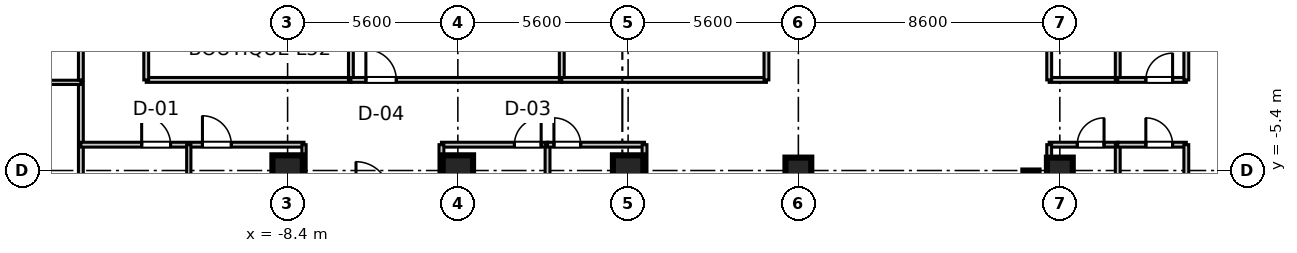
"""IFC4 building model, lengths in metres.
Left out: names, types, materials, properties, quantities, classifications, styles, units other than length and angle.
Written with IfcOpenShell. Run it as: python <this file> out.ifc"""

import sys

from ifc_helpers import new_model, si_unit, direction, frame, frame_2d, origin, origin_2d, place, context, subcontext, project, spatial, rectangle, extrude, source, transform, mapped, element, fill, save


model = new_model("IFC4")
c1 = context("Model", 3, precision=1e-05, world=origin(), true_north=direction((0.0, 1.0)))
c2 = subcontext(c1, "Body", "Model", "MODEL_VIEW")
j1 = project(units=[si_unit("LENGTHUNIT", "METRE"), si_unit("PLANEANGLEUNIT", "RADIAN")], contexts=[c1])
p1 = place(None, origin())
s1 = spatial("IfcSite", under=j1, at=p1, CompositionType="ELEMENT")
p2 = place(p1, origin())
s2 = spatial("IfcBuilding", under=s1, at=p2, CompositionType="ELEMENT")
p3 = place(p2, frame((0.0, 0.0, 204.9)))
s3 = spatial("IfcBuildingStorey", under=s2, at=p3, CompositionType="ELEMENT", Elevation=204.9)
m1 = source(origin(), c2, "Body", "SweptSolid", [
    extrude(rectangle(XDim=1.0, YDim=1.0, at=origin_2d()), origin(), (0.0, 0.0, 1.0), 3.655),
])
for number, where, z_axis, x_axis in (
    (1, (-8.4, -5.4, 0.0), (0.0, 0.0, 1.0), (1.0, 0.0, 0.0)),
    (2, (-2.8, -5.4, 0.0), (0.0, 0.0, 1.0), (1.0, 0.0, 0.0)),
    (3, (2.8, -5.4, 0.0), (0.0, 0.0, 1.0), (1.0, 0.0, 0.0)),
):
    element("IfcColumn", number, at=place(p3, frame(where, z_axis=z_axis, x_axis=x_axis)), inside=s3, PredefinedType="COLUMN", context=c2, shape_type="MappedRepresentation", body=[
        mapped(m1, transform((0.0, 0.0, 0.0), scale=1.0)),
    ])
m2 = source(origin(), c2, "Body", "SweptSolid", [
    extrude(rectangle(XDim=0.85, YDim=0.85, at=origin_2d()), origin(), (0.0, 0.0, 1.0), 3.655),
])
for number, where, z_axis, x_axis in (
    (4, (8.4, -5.4, 0.0), (0.0, 0.0, 1.0), (1.0, 0.0, 0.0)),
    (5, (17.0, -5.4, 0.0), (0.0, 0.0, 1.0), (1.0, 0.0, 0.0)),
):
    element("IfcColumn", number, at=place(p3, frame(where, z_axis=z_axis, x_axis=x_axis)), inside=s3, PredefinedType="PILASTER", context=c2, shape_type="MappedRepresentation", body=[
        mapped(m2, transform((0.0, 0.0, 0.0), scale=1.0)),
    ])
m3 = source(origin(), c2, "Body", "SweptSolid", [
    extrude(rectangle(XDim=11.6, YDim=0.5, at=frame_2d((5.8, 0.0))), origin(), (0.0, 0.0, 1.0), 3.41),
])
p4 = place(p3, frame((16.05, -17.0, 0.0), z_axis=(0.0, 0.0, 1.0), x_axis=(0.0, 1.0, 0.0)))
e6 = element("IfcWall", 6, at=p4, inside=s3, PredefinedType="SHEAR", context=c2, shape_type="MappedRepresentation", body=[
    mapped(m3, transform((0.0, 0.0, 0.0), scale=1.0)),
])
m4 = source(origin(), c2, "Body", "SweptSolid", [
    extrude(rectangle(XDim=2.255, YDim=0.16, at=frame_2d((1.127, 0.0))), origin(), (0.0, 0.0, 1.0), 2.75),
])
p5 = place(p3, frame((16.65, -4.55, 0.0), z_axis=(0.0, 0.0, 1.0), x_axis=(1.0, 0.0, 0.0)))
e7 = element("IfcWall", 7, at=p5, inside=s3, PredefinedType="PARTITIONING", context=c2, shape_type="MappedRepresentation", body=[
    mapped(m4, transform((0.0, 0.0, 0.0), scale=1.0)),
])
p6 = place(p5, frame((0.924, 0.0, 0.0)))
e8 = element("IfcOpeningElement", 8, at=p6, cuts=e7, PredefinedType="OPENING", context=c2, shape_type="SweptSolid", body=[
    extrude(rectangle(XDim=0.88, YDim=2.1, at=frame_2d((0.44, 1.05))), frame((0.0, 0.09, 0.0), z_axis=(0.0, -1.0, 0.0), x_axis=(1.0, 0.0, 0.0)), (0.0, 0.0, 1.0), 0.18),
])
m5 = source(origin(), c2, "Body", "SweptSolid", [
    extrude(rectangle(XDim=19.35, YDim=0.16, at=frame_2d((9.675, 0.0))), origin(), (0.0, 0.0, 1.0), 2.75),
])
for number, where, z_axis, x_axis in (
    (9, (16.65, -23.9, 0.0), (0.0, 0.0, 1.0), (0.0, 1.0, 0.0)),
    (10, (18.905, -23.9, 0.0), (0.0, 0.0, 1.0), (0.0, 1.0, 0.0)),
):
    element("IfcWall", number, at=place(p3, frame(where, z_axis=z_axis, x_axis=x_axis)), inside=s3, PredefinedType="PARTITIONING", context=c2, shape_type="MappedRepresentation", body=[
        mapped(m5, transform((0.0, 0.0, 0.0), scale=1.0)),
    ])
m6 = source(origin(), c2, "Body", "SweptSolid", [
    extrude(rectangle(XDim=2.255, YDim=0.16, at=frame_2d((1.127, 0.0))), origin(), (0.0, 0.0, 1.0), 2.75),
])
p7 = place(p3, frame((18.905, -4.55, 0.0), z_axis=(0.0, 0.0, 1.0), x_axis=(1.0, 0.0, 0.0)))
e11 = element("IfcWall", 11, at=p7, inside=s3, PredefinedType="PARTITIONING", context=c2, shape_type="MappedRepresentation", body=[
    mapped(m6, transform((0.0, 0.0, 0.0), scale=1.0)),
])
p8 = place(p7, frame((0.924, 0.0, 0.0)))
e12 = element("IfcOpeningElement", 12, at=p8, cuts=e11, PredefinedType="OPENING", context=c2, shape_type="SweptSolid", body=[
    extrude(rectangle(XDim=0.88, YDim=2.1, at=frame_2d((0.44, 1.05))), frame((0.0, 0.09, 0.0), z_axis=(0.0, -1.0, 0.0), x_axis=(1.0, 0.0, 0.0)), (0.0, 0.0, 1.0), 0.18),
])
m7 = source(origin(), c2, "Body", "SweptSolid", [
    extrude(rectangle(XDim=17.93, YDim=0.16, at=frame_2d((8.965, 0.0))), origin(), (0.0, 0.0, 1.0), 2.75),
])
p9 = place(p3, frame((21.16, -22.48, 0.0), z_axis=(0.0, 0.0, 1.0), x_axis=(0.0, 1.0, 0.0)))
e13 = element("IfcWall", 13, at=p9, inside=s3, PredefinedType="PARTITIONING", context=c2, shape_type="MappedRepresentation", body=[
    mapped(m7, transform((0.0, 0.0, 0.0), scale=1.0)),
])
m8 = source(origin(), c2, "Body", "SweptSolid", [
    extrude(rectangle(XDim=21.4, YDim=0.16, at=frame_2d((10.7, 0.0))), origin(), (0.0, 0.0, 1.0), 2.75),
])
p10 = place(p3, frame((-15.2, -23.9, 0.0), z_axis=(0.0, 0.0, 1.0), x_axis=(0.0, 1.0, 0.0)))
e14 = element("IfcWall", 14, at=p10, inside=s3, PredefinedType="PARTITIONING", context=c2, shape_type="MappedRepresentation", body=[
    mapped(m8, transform((0.0, 0.0, 0.0), scale=1.0)),
])
p11 = place(p10, frame((12.3, 0.0, 0.0)))
e15 = element("IfcOpeningElement", 15, at=p11, cuts=e14, PredefinedType="OPENING", context=c2, shape_type="SweptSolid", body=[
    extrude(rectangle(XDim=0.95, YDim=2.1, at=frame_2d((0.475, 1.05))), frame((0.0, 0.09, 0.0), z_axis=(0.0, -1.0, 0.0), x_axis=(1.0, 0.0, 0.0)), (0.0, 0.0, 1.0), 0.18),
])
m9 = source(origin(), c2, "Body", "SweptSolid", [
    extrude(rectangle(XDim=5.96, YDim=0.14, at=frame_2d((2.98, 0.0))), origin(), (0.0, 0.0, 1.0), 2.75),
])
p12 = place(p3, frame((-21.16, -2.5, 0.0), z_axis=(0.0, 0.0, 1.0), x_axis=(1.0, 0.0, 0.0)))
e16 = element("IfcWall", 16, at=p12, inside=s3, PredefinedType="PARTITIONING", context=c2, shape_type="MappedRepresentation", body=[
    mapped(m9, transform((0.0, 0.0, 0.0), scale=1.0)),
])
m10 = source(origin(), c2, "Body", "SweptSolid", [
    extrude(rectangle(XDim=7.34, YDim=0.16, at=frame_2d((3.67, 0.0))), origin(), (0.0, 0.0, 1.0), 2.75),
])
p13 = place(p3, frame((-15.2, -4.55, 0.0), z_axis=(0.0, 0.0, 1.0), x_axis=(1.0, 0.0, 0.0)))
e17 = element("IfcWall", 17, at=p13, inside=s3, PredefinedType="PARTITIONING", context=c2, shape_type="MappedRepresentation", body=[
    mapped(m10, transform((0.0, 0.0, 0.0), scale=1.0)),
])
p14 = place(p13, frame((2.0, 0.0, 0.0)))
e18 = element("IfcOpeningElement", 18, at=p14, cuts=e17, PredefinedType="OPENING", context=c2, shape_type="SweptSolid", body=[
    extrude(rectangle(XDim=0.95, YDim=2.1, at=frame_2d((0.475, 1.05))), frame((0.0, 0.09, 0.0), z_axis=(0.0, -1.0, 0.0), x_axis=(1.0, 0.0, 0.0)), (0.0, 0.0, 1.0), 0.18),
])
p15 = place(p13, frame((3.999, 0.0, 0.0)))
e19 = element("IfcOpeningElement", 19, at=p15, cuts=e17, PredefinedType="OPENING", context=c2, shape_type="SweptSolid", body=[
    extrude(rectangle(XDim=0.95, YDim=2.1, at=frame_2d((0.475, 1.05))), frame((0.0, 0.09, 0.0), z_axis=(0.0, -1.0, 0.0), x_axis=(1.0, 0.0, 0.0)), (0.0, 0.0, 1.0), 0.18),
])
m11 = source(origin(), c2, "Body", "SweptSolid", [
    extrude(rectangle(XDim=19.35, YDim=0.14, at=frame_2d((9.675, 0.0))), origin(), (0.0, 0.0, 1.0), 2.75),
])
for number, where, z_axis, x_axis in (
    (20, (-7.86, -23.9, 0.0), (0.0, 0.0, 1.0), (0.0, 1.0, 0.0)),
    (21, (-11.65, -23.9, 0.0), (0.0, 0.0, 1.0), (0.0, 1.0, 0.0)),
):
    element("IfcWall", number, at=place(p3, frame(where, z_axis=z_axis, x_axis=x_axis)), inside=s3, PredefinedType="PARTITIONING", context=c2, shape_type="MappedRepresentation", body=[
        mapped(m11, transform((0.0, 0.0, 0.0), scale=1.0)),
    ])
m12 = source(origin(), c2, "Body", "SweptSolid", [
    extrude(rectangle(XDim=3.49, YDim=0.16, at=frame_2d((1.745, 0.0))), origin(), (0.0, 0.0, 1.0), 2.75),
])
p16 = place(p3, frame((-3.34, -4.55, 0.0), z_axis=(0.0, 0.0, 1.0), x_axis=(1.0, 0.0, 0.0)))
e22 = element("IfcWall", 22, at=p16, inside=s3, PredefinedType="PARTITIONING", context=c2, shape_type="MappedRepresentation", body=[
    mapped(m12, transform((0.0, 0.0, 0.0), scale=1.0)),
])
p17 = place(p16, frame((2.4, 0.0, 0.0)))
e23 = element("IfcOpeningElement", 23, at=p17, cuts=e22, PredefinedType="OPENING", context=c2, shape_type="SweptSolid", body=[
    extrude(rectangle(XDim=0.88, YDim=2.1, at=frame_2d((0.44, 1.05))), frame((0.0, 0.09, 0.0), z_axis=(0.0, -1.0, 0.0), x_axis=(1.0, 0.0, 0.0)), (0.0, 0.0, 1.0), 0.18),
])
for number, where, z_axis, x_axis in (
    (24, (-3.34, -23.9, 0.0), (0.0, 0.0, 1.0), (0.0, 1.0, 0.0)),
    (25, (0.15, -23.9, 0.0), (0.0, 0.0, 1.0), (0.0, 1.0, 0.0)),
):
    element("IfcWall", number, at=place(p3, frame(where, z_axis=z_axis, x_axis=x_axis)), inside=s3, PredefinedType="PARTITIONING", context=c2, shape_type="MappedRepresentation", body=[
        mapped(m5, transform((0.0, 0.0, 0.0), scale=1.0)),
    ])
m13 = source(origin(), c2, "Body", "SweptSolid", [
    extrude(rectangle(XDim=3.19, YDim=0.16, at=frame_2d((1.595, 0.0))), origin(), (0.0, 0.0, 1.0), 2.75),
])
p18 = place(p3, frame((0.15, -4.55, 0.0), z_axis=(0.0, 0.0, 1.0), x_axis=(1.0, 0.0, 0.0)))
e26 = element("IfcWall", 26, at=p18, inside=s3, PredefinedType="PARTITIONING", context=c2, shape_type="MappedRepresentation", body=[
    mapped(m13, transform((0.0, 0.0, 0.0), scale=1.0)),
])
p19 = place(p18, frame((0.21, 0.0, 0.0)))
e27 = element("IfcOpeningElement", 27, at=p19, cuts=e26, PredefinedType="OPENING", context=c2, shape_type="SweptSolid", body=[
    extrude(rectangle(XDim=0.88, YDim=2.1, at=frame_2d((0.44, 1.05))), frame((0.0, 0.09, 0.0), z_axis=(0.0, -1.0, 0.0), x_axis=(1.0, 0.0, 0.0)), (0.0, 0.0, 1.0), 0.18),
])
p20 = place(p3, frame((3.34, -23.9, 0.0), z_axis=(0.0, 0.0, 1.0), x_axis=(0.0, 1.0, 0.0)))
e28 = element("IfcWall", 28, at=p20, inside=s3, PredefinedType="PARTITIONING", context=c2, shape_type="MappedRepresentation", body=[
    mapped(m5, transform((0.0, 0.0, 0.0), scale=1.0)),
])
m14 = source(origin(), c2, "Body", "SweptSolid", [
    extrude(rectangle(XDim=4.84, YDim=0.16, at=frame_2d((2.42, 0.0))), origin(), (0.0, 0.0, 1.0), 2.75),
])
p21 = place(p3, frame((-15.2, -2.42, 0.0), z_axis=(0.0, 0.0, 1.0), x_axis=(0.0, 1.0, 0.0)))
e29 = element("IfcWall", 29, at=p21, inside=s3, PredefinedType="PARTITIONING", context=c2, shape_type="MappedRepresentation", body=[
    mapped(m14, transform((0.0, 0.0, 0.0), scale=1.0)),
])
p22 = place(p21, frame((1.945, 0.0, 0.0)))
e30 = element("IfcOpeningElement", 30, at=p22, cuts=e29, PredefinedType="OPENING", context=c2, shape_type="SweptSolid", body=[
    extrude(rectangle(XDim=0.95, YDim=2.1, at=frame_2d((0.475, 1.05))), frame((0.0, 0.09, 0.0), z_axis=(0.0, -1.0, 0.0), x_axis=(1.0, 0.0, 0.0)), (0.0, 0.0, 1.0), 0.18),
])
m15 = source(origin(), c2, "Body", "SweptSolid", [
    extrude(rectangle(XDim=6.732, YDim=0.16, at=frame_2d((3.366, 0.0))), origin(), (0.0, 0.0, 1.0), 2.75),
])
p23 = place(p3, frame((-13.05, -2.42, 0.0), z_axis=(0.0, 0.0, 1.0), x_axis=(1.0, 0.0, 0.0)))
e31 = element("IfcWall", 31, at=p23, inside=s3, PredefinedType="PARTITIONING", context=c2, shape_type="MappedRepresentation", body=[
    mapped(m15, transform((0.0, 0.0, 0.0), scale=1.0)),
])
for number, where, z_axis, x_axis in (
    (32, (-13.05, -2.42, 0.0), (0.0, 0.0, 1.0), (0.0, 1.0, 0.0)),
    (33, (-6.318, -2.42, 0.0), (0.0, 0.0, 1.0), (0.0, 1.0, 0.0)),
):
    element("IfcWall", number, at=place(p3, frame(where, z_axis=z_axis, x_axis=x_axis)), inside=s3, PredefinedType="PARTITIONING", context=c2, shape_type="MappedRepresentation", body=[
        mapped(m14, transform((0.0, 0.0, 0.0), scale=1.0)),
    ])
m16 = source(origin(), c2, "Body", "SweptSolid", [
    extrude(rectangle(XDim=6.936, YDim=0.16, at=frame_2d((3.468, 0.0))), origin(), (0.0, 0.0, 1.0), 2.75),
])
p24 = place(p3, frame((-6.318, -2.42, 0.0), z_axis=(0.0, 0.0, 1.0), x_axis=(1.0, 0.0, 0.0)))
e34 = element("IfcWall", 34, at=p24, inside=s3, PredefinedType="PARTITIONING", context=c2, shape_type="MappedRepresentation", body=[
    mapped(m16, transform((0.0, 0.0, 0.0), scale=1.0)),
])
p25 = place(p24, frame((0.493, 0.0, 0.0)))
e35 = element("IfcOpeningElement", 35, at=p25, cuts=e34, PredefinedType="OPENING", context=c2, shape_type="SweptSolid", body=[
    extrude(rectangle(XDim=1.0, YDim=2.1, at=frame_2d((0.5, 1.05))), frame((0.0, 0.09, 0.0), z_axis=(0.0, -1.0, 0.0), x_axis=(1.0, 0.0, 0.0)), (0.0, 0.0, 1.0), 0.18),
])
p26 = place(p3, frame((0.618, -2.42, 0.0), z_axis=(0.0, 0.0, 1.0), x_axis=(0.0, 1.0, 0.0)))
e36 = element("IfcWall", 36, at=p26, inside=s3, PredefinedType="PARTITIONING", context=c2, shape_type="MappedRepresentation", body=[
    mapped(m14, transform((0.0, 0.0, 0.0), scale=1.0)),
])
m17 = source(origin(), c2, "Body", "SweptSolid", [
    extrude(rectangle(XDim=6.732, YDim=0.16, at=frame_2d((3.366, 0.0))), origin(), (0.0, 0.0, 1.0), 2.75),
])
p27 = place(p3, frame((0.618, -2.42, 0.0), z_axis=(0.0, 0.0, 1.0), x_axis=(1.0, 0.0, 0.0)))
e37 = element("IfcWall", 37, at=p27, inside=s3, PredefinedType="PARTITIONING", context=c2, shape_type="MappedRepresentation", body=[
    mapped(m17, transform((0.0, 0.0, 0.0), scale=1.0)),
])
p28 = place(p3, frame((7.35, -2.42, 0.0), z_axis=(0.0, 0.0, 1.0), x_axis=(0.0, 1.0, 0.0)))
e38 = element("IfcWall", 38, at=p28, inside=s3, PredefinedType="PARTITIONING", context=c2, shape_type="MappedRepresentation", body=[
    mapped(m14, transform((0.0, 0.0, 0.0), scale=1.0)),
])
p29 = place(p3, frame((16.65, -2.42, 0.0), z_axis=(0.0, 0.0, 1.0), x_axis=(1.0, 0.0, 0.0)))
e39 = element("IfcWall", 39, at=p29, inside=s3, PredefinedType="PARTITIONING", context=c2, shape_type="MappedRepresentation", body=[
    mapped(m4, transform((0.0, 0.0, 0.0), scale=1.0)),
])
for number, where, z_axis, x_axis in (
    (40, (16.65, -2.42, 0.0), (0.0, 0.0, 1.0), (0.0, 1.0, 0.0)),
    (41, (18.905, -2.42, 0.0), (0.0, 0.0, 1.0), (0.0, 1.0, 0.0)),
):
    element("IfcWall", number, at=place(p3, frame(where, z_axis=z_axis, x_axis=x_axis)), inside=s3, PredefinedType="PARTITIONING", context=c2, shape_type="MappedRepresentation", body=[
        mapped(m14, transform((0.0, 0.0, 0.0), scale=1.0)),
    ])
p30 = place(p3, frame((18.905, -2.42, 0.0), z_axis=(0.0, 0.0, 1.0), x_axis=(1.0, 0.0, 0.0)))
e42 = element("IfcWall", 42, at=p30, inside=s3, PredefinedType="PARTITIONING", context=c2, shape_type="MappedRepresentation", body=[
    mapped(m6, transform((0.0, 0.0, 0.0), scale=1.0)),
])
p31 = place(p30, frame((0.924, 0.0, 0.0)))
e43 = element("IfcOpeningElement", 43, at=p31, cuts=e42, PredefinedType="OPENING", context=c2, shape_type="SweptSolid", body=[
    extrude(rectangle(XDim=0.88, YDim=2.1, at=frame_2d((0.44, 1.05))), frame((0.0, 0.09, 0.0), z_axis=(0.0, -1.0, 0.0), x_axis=(1.0, 0.0, 0.0)), (0.0, 0.0, 1.0), 0.18),
])
p32 = place(p3, frame((21.16, -2.42, 0.0), z_axis=(0.0, 0.0, 1.0), x_axis=(0.0, 1.0, 0.0)))
e44 = element("IfcWall", 44, at=p32, inside=s3, PredefinedType="PARTITIONING", context=c2, shape_type="MappedRepresentation", body=[
    mapped(m14, transform((0.0, 0.0, 0.0), scale=1.0)),
])
m18 = source(origin(), c2, "Body", "SweptSolid", [
    extrude(rectangle(XDim=0.88, YDim=2.1, at=frame_2d((0.44, 1.05))), frame((0.0, 0.025, 0.0), z_axis=(0.0, -1.0, 0.0), x_axis=(1.0, 0.0, 0.0)), (0.0, 0.0, 1.0), 0.05),
])
p33 = place(p6, frame((0.88, 0.0, 0.0), z_axis=(0.0, 0.0, 1.0), x_axis=(-1.0, 0.0, 0.0)))
e45 = element("IfcDoor", 45, at=p33, inside=s3, OperationType="SINGLE_SWING_RIGHT", PredefinedType="DOOR", context=c2, shape_type="MappedRepresentation", body=[
    mapped(m18, transform((0.0, 0.0, 0.0), scale=1.0)),
])
fill(e8, e45)
p34 = place(p8, frame((0.88, 0.0, 0.0), z_axis=(0.0, 0.0, 1.0), x_axis=(-1.0, 0.0, 0.0)))
e46 = element("IfcDoor", 46, at=p34, inside=s3, OperationType="SINGLE_SWING_LEFT", PredefinedType="DOOR", context=c2, shape_type="MappedRepresentation", body=[
    mapped(m18, transform((0.0, 0.0, 0.0), scale=1.0)),
])
fill(e12, e46)
m19 = source(origin(), c2, "Body", "SweptSolid", [
    extrude(rectangle(XDim=0.95, YDim=2.1, at=frame_2d((0.475, 1.05))), frame((0.0, 0.025, 0.0), z_axis=(0.0, -1.0, 0.0), x_axis=(1.0, 0.0, 0.0)), (0.0, 0.0, 1.0), 0.05),
])
p35 = place(p14, frame((0.95, 0.0, 0.0), z_axis=(0.0, 0.0, 1.0), x_axis=(-1.0, 0.0, 0.0)))
e47 = element("IfcDoor", 47, at=p35, inside=s3, OperationType="SINGLE_SWING_LEFT", PredefinedType="DOOR", context=c2, shape_type="MappedRepresentation", body=[
    mapped(m19, transform((0.0, 0.0, 0.0), scale=1.0)),
])
fill(e18, e47)
p36 = place(p15, frame((0.95, 0.0, 0.0), z_axis=(0.0, 0.0, 1.0), x_axis=(-1.0, 0.0, 0.0)))
e48 = element("IfcDoor", 48, at=p36, inside=s3, OperationType="SINGLE_SWING_LEFT", PredefinedType="DOOR", context=c2, shape_type="MappedRepresentation", body=[
    mapped(m19, transform((0.0, 0.0, 0.0), scale=1.0)),
])
fill(e19, e48)
p37 = place(p17, frame((0.88, 0.0, 0.0), z_axis=(0.0, 0.0, 1.0), x_axis=(-1.0, 0.0, 0.0)))
e49 = element("IfcDoor", 49, at=p37, inside=s3, OperationType="SINGLE_SWING_RIGHT", PredefinedType="DOOR", context=c2, shape_type="MappedRepresentation", body=[
    mapped(m18, transform((0.0, 0.0, 0.0), scale=1.0)),
])
fill(e23, e49)
p38 = place(p19, frame((0.88, 0.0, 0.0), z_axis=(0.0, 0.0, 1.0), x_axis=(-1.0, 0.0, 0.0)))
e50 = element("IfcDoor", 50, at=p38, inside=s3, OperationType="SINGLE_SWING_LEFT", PredefinedType="DOOR", context=c2, shape_type="MappedRepresentation", body=[
    mapped(m18, transform((0.0, 0.0, 0.0), scale=1.0)),
])
fill(e27, e50)
m20 = source(origin(), c2, "Body", "SweptSolid", [
    extrude(rectangle(XDim=1.0, YDim=2.1, at=frame_2d((0.5, 1.05))), frame((0.0, 0.025, 0.0), z_axis=(0.0, -1.0, 0.0), x_axis=(1.0, 0.0, 0.0)), (0.0, 0.0, 1.0), 0.05),
])
p39 = place(p25, origin())
e51 = element("IfcDoor", 51, at=p39, inside=s3, OperationType="SINGLE_SWING_LEFT", PredefinedType="DOOR", context=c2, shape_type="MappedRepresentation", body=[
    mapped(m20, transform((0.0, 0.0, 0.0), scale=1.0)),
])
fill(e35, e51)
p40 = place(p31, origin())
e52 = element("IfcDoor", 52, at=p40, inside=s3, OperationType="SINGLE_SWING_RIGHT", PredefinedType="DOOR", context=c2, shape_type="MappedRepresentation", body=[
    mapped(m18, transform((0.0, 0.0, 0.0), scale=1.0)),
])
fill(e43, e52)
save(model, sys.argv[1])
